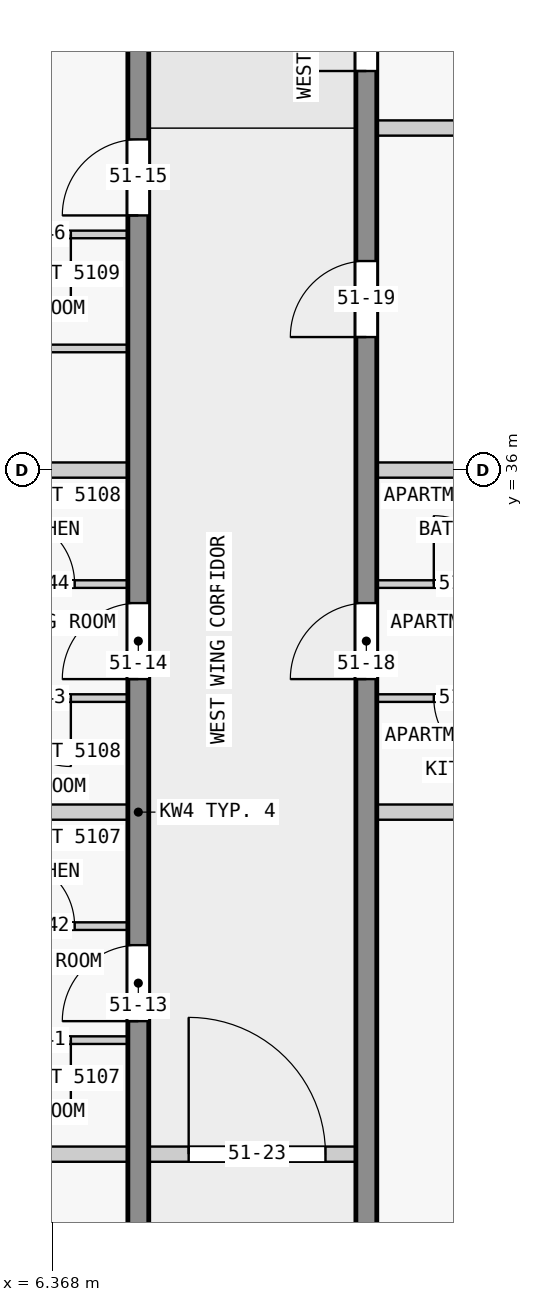
"""IFC4 building model, lengths in metres.
Left out: names, types, materials, properties, quantities, classifications, styles, units other than length and angle.
Written with IfcOpenShell. Run it as: python <this file> out.ifc"""

import sys

from ifc_helpers import new_model, si_unit, direction, frame, frame_2d, origin, place, context, subcontext, project, spatial, rectangle, extrude, element, fill, save


model = new_model("IFC4")
c1 = context("Model", 3, precision=1e-05, world=origin(), true_north=direction((0.0, 1.0)))
c2 = subcontext(c1, "Body", "Model", "MODEL_VIEW")
j1 = project(units=[si_unit("LENGTHUNIT", "METRE"), si_unit("PLANEANGLEUNIT", "RADIAN")], contexts=[c1])
p1 = place(None, origin())
s1 = spatial("IfcSite", under=j1, at=p1, CompositionType="ELEMENT")
p2 = place(p1, origin())
s2 = spatial("IfcBuilding", under=s1, at=p2, CompositionType="ELEMENT")
p3 = place(p2, frame((0.0, 0.0, 197.9)))
s3 = spatial("IfcBuildingStorey", under=s2, at=p3, CompositionType="ELEMENT", Elevation=197.9)
p4 = place(p3, frame((7.5, 18.0, 0.0), z_axis=(0.0, 0.0, 1.0), x_axis=(0.0, 1.0, 0.0)))
e1 = element("IfcWall", 1, at=p4, inside=s3, PredefinedType="SHEAR", context=c2, shape_type="SweptSolid", body=[
    extrude(rectangle(XDim=27.0, YDim=0.275, at=frame_2d((13.5, 0.0))), origin(), (0.0, 0.0, 1.0), 3.25),
])
p5 = place(p4, frame((1.75, 0.0, 0.0)))
e2 = element("IfcOpeningElement", 2, at=p5, cuts=e1, PredefinedType="OPENING", context=c2, shape_type="SweptSolid", body=[
    extrude(rectangle(XDim=1.0, YDim=2.1, at=frame_2d((0.5, 1.05))), frame((0.0, 0.147, 0.0), z_axis=(0.0, -1.0, 0.0), x_axis=(1.0, 0.0, 0.0)), (0.0, 0.0, 1.0), 0.295),
])
p6 = place(p4, frame((5.85, 0.0, 0.0)))
e3 = element("IfcOpeningElement", 3, at=p6, cuts=e1, PredefinedType="OPENING", context=c2, shape_type="SweptSolid", body=[
    extrude(rectangle(XDim=1.8, YDim=2.1, at=frame_2d((0.9, 1.05))), frame((0.0, 0.147, 0.0), z_axis=(0.0, -1.0, 0.0), x_axis=(1.0, 0.0, 0.0)), (0.0, 0.0, 1.0), 0.295),
])
p7 = place(p4, frame((10.75, 0.0, 0.0)))
e4 = element("IfcOpeningElement", 4, at=p7, cuts=e1, PredefinedType="OPENING", context=c2, shape_type="SweptSolid", body=[
    extrude(rectangle(XDim=1.0, YDim=2.1, at=frame_2d((0.5, 1.05))), frame((0.0, 0.147, 0.0), z_axis=(0.0, -1.0, 0.0), x_axis=(1.0, 0.0, 0.0)), (0.0, 0.0, 1.0), 0.295),
])
p8 = place(p4, frame((15.25, 0.0, 0.0)))
e5 = element("IfcOpeningElement", 5, at=p8, cuts=e1, PredefinedType="OPENING", context=c2, shape_type="SweptSolid", body=[
    extrude(rectangle(XDim=1.0, YDim=2.1, at=frame_2d((0.5, 1.05))), frame((0.0, 0.147, 0.0), z_axis=(0.0, -1.0, 0.0), x_axis=(1.0, 0.0, 0.0)), (0.0, 0.0, 1.0), 0.295),
])
p9 = place(p4, frame((21.35, 0.0, 0.0)))
e6 = element("IfcOpeningElement", 6, at=p9, cuts=e1, PredefinedType="OPENING", context=c2, shape_type="SweptSolid", body=[
    extrude(rectangle(XDim=1.0, YDim=2.1, at=frame_2d((0.5, 1.05))), frame((0.0, 0.147, 0.0), z_axis=(0.0, -1.0, 0.0), x_axis=(1.0, 0.0, 0.0)), (0.0, 0.0, 1.0), 0.295),
])
p10 = place(p3, frame((10.5, 18.0, 0.0), z_axis=(0.0, 0.0, 1.0), x_axis=(0.0, 1.0, 0.0)))
e7 = element("IfcWall", 7, at=p10, inside=s3, PredefinedType="SHEAR", context=c2, shape_type="SweptSolid", body=[
    extrude(rectangle(XDim=27.0, YDim=0.275, at=frame_2d((13.5, 0.0))), origin(), (0.0, 0.0, 1.0), 3.25),
])
p11 = place(p10, frame((1.75, 0.0, 0.0)))
e8 = element("IfcOpeningElement", 8, at=p11, cuts=e7, PredefinedType="OPENING", context=c2, shape_type="SweptSolid", body=[
    extrude(rectangle(XDim=1.0, YDim=2.1, at=frame_2d((0.5, 1.05))), frame((0.0, 0.147, 0.0), z_axis=(0.0, -1.0, 0.0), x_axis=(1.0, 0.0, 0.0)), (0.0, 0.0, 1.0), 0.295),
])
p12 = place(p10, frame((6.25, 0.0, 0.0)))
e9 = element("IfcOpeningElement", 9, at=p12, cuts=e7, PredefinedType="OPENING", context=c2, shape_type="SweptSolid", body=[
    extrude(rectangle(XDim=1.0, YDim=2.1, at=frame_2d((0.5, 1.05))), frame((0.0, 0.147, 0.0), z_axis=(0.0, -1.0, 0.0), x_axis=(1.0, 0.0, 0.0)), (0.0, 0.0, 1.0), 0.295),
])
p13 = place(p10, frame((15.25, 0.0, 0.0)))
e10 = element("IfcOpeningElement", 10, at=p13, cuts=e7, PredefinedType="OPENING", context=c2, shape_type="SweptSolid", body=[
    extrude(rectangle(XDim=1.0, YDim=2.1, at=frame_2d((0.5, 1.05))), frame((0.0, 0.147, 0.0), z_axis=(0.0, -1.0, 0.0), x_axis=(1.0, 0.0, 0.0)), (0.0, 0.0, 1.0), 0.295),
])
p14 = place(p10, frame((19.75, 0.0, 0.0)))
e11 = element("IfcOpeningElement", 11, at=p14, cuts=e7, PredefinedType="OPENING", context=c2, shape_type="SweptSolid", body=[
    extrude(rectangle(XDim=1.0, YDim=2.1, at=frame_2d((0.5, 1.05))), frame((0.0, 0.147, 0.0), z_axis=(0.0, -1.0, 0.0), x_axis=(1.0, 0.0, 0.0)), (0.0, 0.0, 1.0), 0.295),
])
p15 = place(p10, frame((23.25, 0.0, 0.0)))
e12 = element("IfcOpeningElement", 12, at=p15, cuts=e7, PredefinedType="OPENING", context=c2, shape_type="SweptSolid", body=[
    extrude(rectangle(XDim=0.9, YDim=2.1, at=frame_2d((0.45, 1.05))), frame((0.0, 0.147, 0.0), z_axis=(0.0, -1.0, 0.0), x_axis=(1.0, 0.0, 0.0)), (0.0, 0.0, 1.0), 0.295),
])
p16 = place(p10, frame((25.45, 0.0, 0.0)))
e13 = element("IfcOpeningElement", 13, at=p16, cuts=e7, PredefinedType="OPENING", context=c2, shape_type="SweptSolid", body=[
    extrude(rectangle(XDim=1.0, YDim=2.1, at=frame_2d((0.5, 1.05))), frame((0.0, 0.147, 0.0), z_axis=(0.0, -1.0, 0.0), x_axis=(1.0, 0.0, 0.0)), (0.0, 0.0, 1.0), 0.295),
])
p17 = place(p3, frame((7.363, 27.0, 0.0), z_axis=(0.0, 0.0, 1.0), x_axis=(-1.0, 0.0, 0.0)))
e14 = element("IfcWall", 14, at=p17, inside=s3, PredefinedType="PARTITIONING", context=c2, shape_type="SweptSolid", body=[
    extrude(rectangle(XDim=7.443, YDim=0.2, at=frame_2d((3.721, 0.0))), origin(), (0.0, 0.0, 1.0), 3.25),
])
p18 = place(p3, frame((7.363, 28.5, 0.0), z_axis=(0.0, 0.0, 1.0), x_axis=(-1.0, 0.0, 0.0)))
e15 = element("IfcWall", 15, at=p18, inside=s3, PredefinedType="PARTITIONING", context=c2, shape_type="SweptSolid", body=[
    extrude(rectangle(XDim=2.4, YDim=0.1, at=frame_2d((1.2, 0.0))), origin(), (0.0, 0.0, 1.0), 3.25),
])
p19 = place(p18, frame((0.75, 0.0, 0.0)))
e16 = element("IfcOpeningElement", 16, at=p19, cuts=e15, PredefinedType="OPENING", context=c2, shape_type="SweptSolid", body=[
    extrude(rectangle(XDim=0.9, YDim=2.1, at=frame_2d((0.45, 1.05))), frame((0.0, 0.06, 0.0), z_axis=(0.0, -1.0, 0.0), x_axis=(1.0, 0.0, 0.0)), (0.0, 0.0, 1.0), 0.12),
])
p20 = place(p3, frame((5.012, 30.0, 0.0), z_axis=(0.0, 0.0, 1.0), x_axis=(1.0, 0.0, 0.0)))
e17 = element("IfcWall", 17, at=p20, inside=s3, PredefinedType="PARTITIONING", context=c2, shape_type="SweptSolid", body=[
    extrude(rectangle(XDim=2.35, YDim=0.1, at=frame_2d((1.175, 0.0))), origin(), (0.0, 0.0, 1.0), 3.25),
])
p21 = place(p20, frame((0.75, 0.0, 0.0)))
e18 = element("IfcOpeningElement", 18, at=p21, cuts=e17, PredefinedType="OPENING", context=c2, shape_type="SweptSolid", body=[
    extrude(rectangle(XDim=0.9, YDim=2.1, at=frame_2d((0.45, 1.05))), frame((0.0, 0.06, 0.0), z_axis=(0.0, -1.0, 0.0), x_axis=(1.0, 0.0, 0.0)), (0.0, 0.0, 1.0), 0.12),
])
p22 = place(p3, frame((7.363, 31.5, 0.0), z_axis=(0.0, 0.0, 1.0), x_axis=(-1.0, 0.0, 0.0)))
e19 = element("IfcWall", 19, at=p22, inside=s3, PredefinedType="PARTITIONING", context=c2, shape_type="SweptSolid", body=[
    extrude(rectangle(XDim=2.3, YDim=0.2, at=frame_2d((1.15, 0.0))), origin(), (0.0, 0.0, 1.0), 3.25),
])
p23 = place(p3, frame((17.85, 31.5, 0.0), z_axis=(0.0, 0.0, 1.0), x_axis=(-1.0, 0.0, 0.0)))
e20 = element("IfcWall", 20, at=p23, inside=s3, PredefinedType="PARTITIONING", context=c2, shape_type="SweptSolid", body=[
    extrude(rectangle(XDim=7.213, YDim=0.2, at=frame_2d((3.606, 0.0))), origin(), (0.0, 0.0, 1.0), 3.25),
])
p24 = place(p3, frame((7.363, 33.0, 0.0), z_axis=(0.0, 0.0, 1.0), x_axis=(-1.0, 0.0, 0.0)))
e21 = element("IfcWall", 21, at=p24, inside=s3, PredefinedType="PARTITIONING", context=c2, shape_type="SweptSolid", body=[
    extrude(rectangle(XDim=2.35, YDim=0.1, at=frame_2d((1.175, 0.0))), origin(), (0.0, 0.0, 1.0), 3.25),
])
p25 = place(p24, frame((0.75, 0.0, 0.0)))
e22 = element("IfcOpeningElement", 22, at=p25, cuts=e21, PredefinedType="OPENING", context=c2, shape_type="SweptSolid", body=[
    extrude(rectangle(XDim=0.9, YDim=2.1, at=frame_2d((0.45, 1.05))), frame((0.0, 0.06, 0.0), z_axis=(0.0, -1.0, 0.0), x_axis=(1.0, 0.0, 0.0)), (0.0, 0.0, 1.0), 0.12),
])
p26 = place(p3, frame((13.038, 33.0, 0.0), z_axis=(0.0, 0.0, 1.0), x_axis=(-1.0, 0.0, 0.0)))
e23 = element("IfcWall", 23, at=p26, inside=s3, PredefinedType="PARTITIONING", context=c2, shape_type="SweptSolid", body=[
    extrude(rectangle(XDim=2.4, YDim=0.1, at=frame_2d((1.2, 0.0))), origin(), (0.0, 0.0, 1.0), 3.25),
])
p27 = place(p26, frame((0.75, 0.0, 0.0)))
e24 = element("IfcOpeningElement", 24, at=p27, cuts=e23, PredefinedType="OPENING", context=c2, shape_type="SweptSolid", body=[
    extrude(rectangle(XDim=0.9, YDim=2.1, at=frame_2d((0.45, 1.05))), frame((0.0, 0.06, 0.0), z_axis=(0.0, -1.0, 0.0), x_axis=(1.0, 0.0, 0.0)), (0.0, 0.0, 1.0), 0.12),
])
p28 = place(p3, frame((5.012, 34.5, 0.0), z_axis=(0.0, 0.0, 1.0), x_axis=(1.0, 0.0, 0.0)))
e25 = element("IfcWall", 25, at=p28, inside=s3, PredefinedType="PARTITIONING", context=c2, shape_type="SweptSolid", body=[
    extrude(rectangle(XDim=2.35, YDim=0.1, at=frame_2d((1.175, 0.0))), origin(), (0.0, 0.0, 1.0), 3.25),
])
p29 = place(p28, frame((0.75, 0.0, 0.0)))
e26 = element("IfcOpeningElement", 26, at=p29, cuts=e25, PredefinedType="OPENING", context=c2, shape_type="SweptSolid", body=[
    extrude(rectangle(XDim=0.9, YDim=2.1, at=frame_2d((0.45, 1.05))), frame((0.0, 0.06, 0.0), z_axis=(0.0, -1.0, 0.0), x_axis=(1.0, 0.0, 0.0)), (0.0, 0.0, 1.0), 0.12),
])
p30 = place(p3, frame((10.637, 34.5, 0.0), z_axis=(0.0, 0.0, 1.0), x_axis=(1.0, 0.0, 0.0)))
e27 = element("IfcWall", 27, at=p30, inside=s3, PredefinedType="PARTITIONING", context=c2, shape_type="SweptSolid", body=[
    extrude(rectangle(XDim=2.4, YDim=0.1, at=frame_2d((1.2, 0.0))), origin(), (0.0, 0.0, 1.0), 3.25),
])
p31 = place(p30, frame((0.75, 0.0, 0.0)))
e28 = element("IfcOpeningElement", 28, at=p31, cuts=e27, PredefinedType="OPENING", context=c2, shape_type="SweptSolid", body=[
    extrude(rectangle(XDim=0.9, YDim=2.1, at=frame_2d((0.45, 1.05))), frame((0.0, 0.06, 0.0), z_axis=(0.0, -1.0, 0.0), x_axis=(1.0, 0.0, 0.0)), (0.0, 0.0, 1.0), 0.12),
])
for number, where, z_axis, x_axis in (
    (29, (7.363, 36.0, 0.0), (0.0, 0.0, 1.0), (-1.0, 0.0, 0.0)),
    (30, (12.938, 36.0, 0.0), (0.0, 0.0, 1.0), (-1.0, 0.0, 0.0)),
):
    element("IfcWall", number, at=place(p3, frame(where, z_axis=z_axis, x_axis=x_axis)), inside=s3, PredefinedType="PARTITIONING", context=c2, shape_type="SweptSolid", body=[
        extrude(rectangle(XDim=2.3, YDim=0.2, at=frame_2d((1.15, 0.0))), origin(), (0.0, 0.0, 1.0), 3.25),
    ])
p32 = place(p3, frame((7.363, 37.6, 0.0), z_axis=(0.0, 0.0, 1.0), x_axis=(-1.0, 0.0, 0.0)))
e31 = element("IfcWall", 31, at=p32, inside=s3, PredefinedType="PARTITIONING", context=c2, shape_type="SweptSolid", body=[
    extrude(rectangle(XDim=2.35, YDim=0.1, at=frame_2d((1.175, 0.0))), origin(), (0.0, 0.0, 1.0), 3.25),
])
p33 = place(p3, frame((7.363, 39.1, 0.0), z_axis=(0.0, 0.0, 1.0), x_axis=(-1.0, 0.0, 0.0)))
e32 = element("IfcWall", 32, at=p33, inside=s3, PredefinedType="PARTITIONING", context=c2, shape_type="SweptSolid", body=[
    extrude(rectangle(XDim=2.35, YDim=0.1, at=frame_2d((1.175, 0.0))), origin(), (0.0, 0.0, 1.0), 3.25),
])
p34 = place(p33, frame((0.75, 0.0, 0.0)))
e33 = element("IfcOpeningElement", 33, at=p34, cuts=e32, PredefinedType="OPENING", context=c2, shape_type="SweptSolid", body=[
    extrude(rectangle(XDim=0.9, YDim=2.1, at=frame_2d((0.45, 1.05))), frame((0.0, 0.06, 0.0), z_axis=(0.0, -1.0, 0.0), x_axis=(1.0, 0.0, 0.0)), (0.0, 0.0, 1.0), 0.12),
])
p35 = place(p3, frame((18.08, 40.5, 0.0), z_axis=(0.0, 0.0, 1.0), x_axis=(-1.0, 0.0, 0.0)))
e34 = element("IfcWall", 34, at=p35, inside=s3, PredefinedType="PARTITIONING", context=c2, shape_type="SweptSolid", body=[
    extrude(rectangle(XDim=7.443, YDim=0.2, at=frame_2d((3.721, 0.0))), origin(), (0.0, 0.0, 1.0), 3.25),
])
p36 = place(p3, frame((7.462, 27.0, 0.0), z_axis=(0.0, 0.0, 1.0), x_axis=(1.0, 0.0, 0.0)))
e35 = element("IfcWall", 35, at=p36, inside=s3, PredefinedType="PARTITIONING", context=c2, shape_type="SweptSolid", body=[
    extrude(rectangle(XDim=3.175, YDim=0.2, at=frame_2d((1.587, 0.0))), origin(), (0.0, 0.0, 1.0), 3.25),
])
p37 = place(p36, frame((0.7, 0.0, 0.0)))
e36 = element("IfcOpeningElement", 36, at=p37, cuts=e35, PredefinedType="OPENING", context=c2, shape_type="SweptSolid", body=[
    extrude(rectangle(XDim=1.8, YDim=2.1, at=frame_2d((0.9, 1.05))), frame((0.0, 0.11, 0.0), z_axis=(0.0, -1.0, 0.0), x_axis=(1.0, 0.0, 0.0)), (0.0, 0.0, 1.0), 0.22),
])
p38 = place(p7, origin())
e37 = element("IfcDoor", 37, at=p38, inside=s3, OperationType="SINGLE_SWING_LEFT", PredefinedType="DOOR", context=c2, shape_type="SweptSolid", body=[
    extrude(rectangle(XDim=1.0, YDim=2.1, at=frame_2d((0.5, 1.05))), frame((0.0, 0.025, 0.0), z_axis=(0.0, -1.0, 0.0), x_axis=(1.0, 0.0, 0.0)), (0.0, 0.0, 1.0), 0.05),
])
fill(e4, e37)
p39 = place(p8, origin())
e38 = element("IfcDoor", 38, at=p39, inside=s3, OperationType="SINGLE_SWING_RIGHT", PredefinedType="DOOR", context=c2, shape_type="SweptSolid", body=[
    extrude(rectangle(XDim=1.0, YDim=2.1, at=frame_2d((0.5, 1.05))), frame((0.0, 0.025, 0.0), z_axis=(0.0, -1.0, 0.0), x_axis=(1.0, 0.0, 0.0)), (0.0, 0.0, 1.0), 0.05),
])
fill(e5, e38)
p40 = place(p9, origin())
e39 = element("IfcDoor", 39, at=p40, inside=s3, OperationType="SINGLE_SWING_RIGHT", PredefinedType="DOOR", context=c2, shape_type="SweptSolid", body=[
    extrude(rectangle(XDim=1.0, YDim=2.1, at=frame_2d((0.5, 1.05))), frame((0.0, 0.025, 0.0), z_axis=(0.0, -1.0, 0.0), x_axis=(1.0, 0.0, 0.0)), (0.0, 0.0, 1.0), 0.05),
])
fill(e6, e39)
p41 = place(p13, origin())
e40 = element("IfcDoor", 40, at=p41, inside=s3, OperationType="SINGLE_SWING_RIGHT", PredefinedType="DOOR", context=c2, shape_type="SweptSolid", body=[
    extrude(rectangle(XDim=1.0, YDim=2.1, at=frame_2d((0.5, 1.05))), frame((0.0, 0.025, 0.0), z_axis=(0.0, -1.0, 0.0), x_axis=(1.0, 0.0, 0.0)), (0.0, 0.0, 1.0), 0.05),
])
fill(e10, e40)
p42 = place(p14, origin())
e41 = element("IfcDoor", 41, at=p42, inside=s3, OperationType="SINGLE_SWING_RIGHT", PredefinedType="DOOR", context=c2, shape_type="SweptSolid", body=[
    extrude(rectangle(XDim=1.0, YDim=2.1, at=frame_2d((0.5, 1.05))), frame((0.0, 0.025, 0.0), z_axis=(0.0, -1.0, 0.0), x_axis=(1.0, 0.0, 0.0)), (0.0, 0.0, 1.0), 0.05),
])
fill(e11, e41)
p43 = place(p15, origin())
e42 = element("IfcDoor", 42, at=p43, inside=s3, OperationType="SINGLE_SWING_RIGHT", PredefinedType="DOOR", context=c2, shape_type="SweptSolid", body=[
    extrude(rectangle(XDim=0.9, YDim=2.1, at=frame_2d((0.45, 1.05))), frame((0.0, 0.025, 0.0), z_axis=(0.0, -1.0, 0.0), x_axis=(1.0, 0.0, 0.0)), (0.0, 0.0, 1.0), 0.05),
])
fill(e12, e42)
p44 = place(p37, origin())
e43 = element("IfcDoor", 43, at=p44, inside=s3, OperationType="SINGLE_SWING_RIGHT", PredefinedType="DOOR", context=c2, shape_type="SweptSolid", body=[
    extrude(rectangle(XDim=1.8, YDim=2.1, at=frame_2d((0.9, 1.05))), frame((0.0, 0.025, 0.0), z_axis=(0.0, -1.0, 0.0), x_axis=(1.0, 0.0, 0.0)), (0.0, 0.0, 1.0), 0.05),
])
fill(e36, e43)
p45 = place(p19, origin())
e44 = element("IfcDoor", 44, at=p45, inside=s3, OperationType="SINGLE_SWING_RIGHT", PredefinedType="DOOR", context=c2, shape_type="SweptSolid", body=[
    extrude(rectangle(XDim=0.9, YDim=2.1, at=frame_2d((0.45, 1.05))), frame((0.0, 0.025, 0.0), z_axis=(0.0, -1.0, 0.0), x_axis=(1.0, 0.0, 0.0)), (0.0, 0.0, 1.0), 0.05),
])
fill(e16, e44)
p46 = place(p21, origin())
e45 = element("IfcDoor", 45, at=p46, inside=s3, OperationType="SINGLE_SWING_RIGHT", PredefinedType="DOOR", context=c2, shape_type="SweptSolid", body=[
    extrude(rectangle(XDim=0.9, YDim=2.1, at=frame_2d((0.45, 1.05))), frame((0.0, 0.025, 0.0), z_axis=(0.0, -1.0, 0.0), x_axis=(1.0, 0.0, 0.0)), (0.0, 0.0, 1.0), 0.05),
])
fill(e18, e45)
p47 = place(p25, origin())
e46 = element("IfcDoor", 46, at=p47, inside=s3, OperationType="SINGLE_SWING_RIGHT", PredefinedType="DOOR", context=c2, shape_type="SweptSolid", body=[
    extrude(rectangle(XDim=0.9, YDim=2.1, at=frame_2d((0.45, 1.05))), frame((0.0, 0.025, 0.0), z_axis=(0.0, -1.0, 0.0), x_axis=(1.0, 0.0, 0.0)), (0.0, 0.0, 1.0), 0.05),
])
fill(e22, e46)
p48 = place(p29, origin())
e47 = element("IfcDoor", 47, at=p48, inside=s3, OperationType="SINGLE_SWING_RIGHT", PredefinedType="DOOR", context=c2, shape_type="SweptSolid", body=[
    extrude(rectangle(XDim=0.9, YDim=2.1, at=frame_2d((0.45, 1.05))), frame((0.0, 0.025, 0.0), z_axis=(0.0, -1.0, 0.0), x_axis=(1.0, 0.0, 0.0)), (0.0, 0.0, 1.0), 0.05),
])
fill(e26, e47)
p49 = place(p34, origin())
e48 = element("IfcDoor", 48, at=p49, inside=s3, OperationType="SINGLE_SWING_RIGHT", PredefinedType="DOOR", context=c2, shape_type="SweptSolid", body=[
    extrude(rectangle(XDim=0.9, YDim=2.1, at=frame_2d((0.45, 1.05))), frame((0.0, 0.025, 0.0), z_axis=(0.0, -1.0, 0.0), x_axis=(1.0, 0.0, 0.0)), (0.0, 0.0, 1.0), 0.05),
])
fill(e33, e48)
p50 = place(p27, origin())
e49 = element("IfcDoor", 49, at=p50, inside=s3, OperationType="SINGLE_SWING_LEFT", PredefinedType="DOOR", context=c2, shape_type="SweptSolid", body=[
    extrude(rectangle(XDim=0.9, YDim=2.1, at=frame_2d((0.45, 1.05))), frame((0.0, 0.025, 0.0), z_axis=(0.0, -1.0, 0.0), x_axis=(1.0, 0.0, 0.0)), (0.0, 0.0, 1.0), 0.05),
])
fill(e24, e49)
p51 = place(p31, origin())
e50 = element("IfcDoor", 50, at=p51, inside=s3, OperationType="SINGLE_SWING_LEFT", PredefinedType="DOOR", context=c2, shape_type="SweptSolid", body=[
    extrude(rectangle(XDim=0.9, YDim=2.1, at=frame_2d((0.45, 1.05))), frame((0.0, 0.025, 0.0), z_axis=(0.0, -1.0, 0.0), x_axis=(1.0, 0.0, 0.0)), (0.0, 0.0, 1.0), 0.05),
])
fill(e28, e50)
save(model, sys.argv[1])
